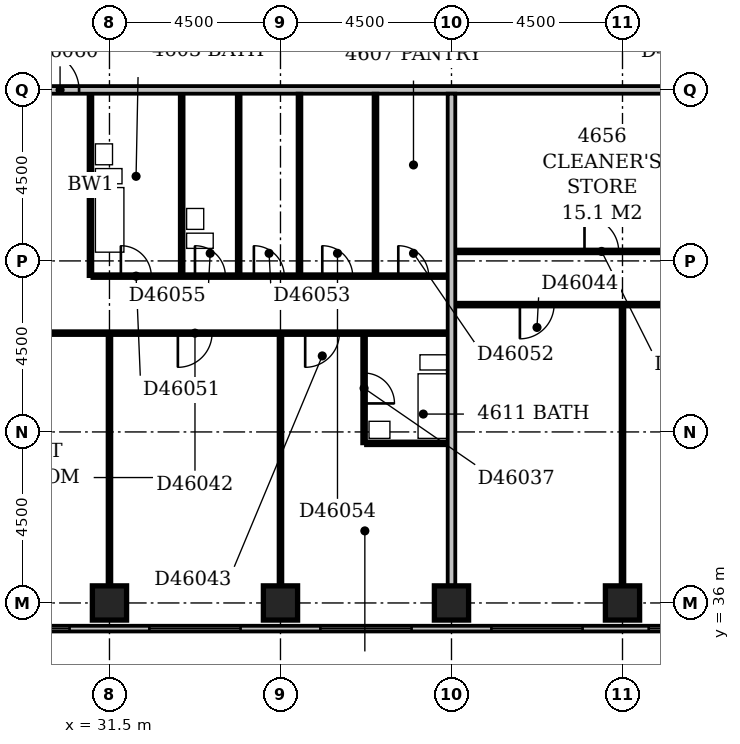
"""IFC4 building model, lengths in metres.
Left out: names, types, materials, properties, quantities, classifications, styles, units other than length and angle.
Written with IfcOpenShell. Run it as: python <this file> out.ifc"""

import sys

from ifc_helpers import new_model, si_unit, direction, frame, frame_2d, origin, origin_2d, place, context, subcontext, project, spatial, rectangle, extrude, element, fill, save


model = new_model("IFC4")
c1 = context("Model", 3, precision=1e-05, world=origin(), true_north=direction((0.0, 1.0)))
c2 = subcontext(c1, "Body", "Model", "MODEL_VIEW")
j1 = project(units=[si_unit("LENGTHUNIT", "METRE"), si_unit("PLANEANGLEUNIT", "RADIAN")], contexts=[c1])
p1 = place(None, origin())
s1 = spatial("IfcSite", under=j1, at=p1, CompositionType="ELEMENT")
p2 = place(p1, origin())
s2 = spatial("IfcBuilding", under=s1, at=p2, CompositionType="ELEMENT")
p3 = place(p2, frame((0.0, 0.0, 182.6)))
s3 = spatial("IfcBuildingStorey", under=s2, at=p3, CompositionType="ELEMENT", Elevation=182.6)
for number, where, z_axis, x_axis in (
    (1, (31.5, 36.0, -0.3), (0.0, 0.0, 1.0), (1.0, 0.0, 0.0)),
    (2, (36.0, 36.0, -0.3), (0.0, 0.0, 1.0), (1.0, 0.0, 0.0)),
    (3, (40.5, 36.0, -0.3), (0.0, 0.0, 1.0), (1.0, 0.0, 0.0)),
    (4, (45.0, 36.0, -0.3), (0.0, 0.0, 1.0), (1.0, 0.0, 0.0)),
):
    element("IfcColumn", number, at=place(p3, frame(where, z_axis=z_axis, x_axis=x_axis)), inside=s3, PredefinedType="COLUMN", context=c2, shape_type="SweptSolid", body=[
        extrude(rectangle(XDim=0.9, YDim=0.9, at=origin_2d()), origin(), (0.0, 0.0, 1.0), 3.55),
    ])
p4 = place(p3, frame((23.1, 35.325, 0.0), z_axis=(0.0, 0.0, 1.0), x_axis=(1.0, 0.0, 0.0)))
e5 = element("IfcWall", 5, at=p4, inside=s3, PredefinedType="STANDARD", context=c2, shape_type="SweptSolid", body=[
    extrude(rectangle(XDim=45.15, YDim=0.15, at=frame_2d((22.575, 0.0))), origin(), (0.0, 0.0, 1.0), 2.7),
])
p5 = place(p4, frame((1.989, 0.0, 0.6)))
e6 = element("IfcOpeningElement", 6, at=p5, cuts=e5, PredefinedType="OPENING", context=c2, shape_type="SweptSolid", body=[
    extrude(rectangle(XDim=1.2, YDim=1.8, at=frame_2d((0.6, 0.9))), frame((0.0, 0.087, 0.0), z_axis=(0.0, -1.0, 0.0), x_axis=(1.0, 0.0, 0.0)), (0.0, 0.0, 1.0), 0.174),
])
p6 = place(p4, frame((4.95, 0.0, 0.6)))
e7 = element("IfcOpeningElement", 7, at=p6, cuts=e5, PredefinedType="OPENING", context=c2, shape_type="SweptSolid", body=[
    extrude(rectangle(XDim=2.4, YDim=1.8, at=frame_2d((1.2, 0.9))), frame((0.0, 0.087, 0.0), z_axis=(0.0, -1.0, 0.0), x_axis=(1.0, 0.0, 0.0)), (0.0, 0.0, 1.0), 0.174),
])
p7 = place(p4, frame((9.45, 0.0, 0.6)))
e8 = element("IfcOpeningElement", 8, at=p7, cuts=e5, PredefinedType="OPENING", context=c2, shape_type="SweptSolid", body=[
    extrude(rectangle(XDim=2.4, YDim=1.8, at=frame_2d((1.2, 0.9))), frame((0.0, 0.087, 0.0), z_axis=(0.0, -1.0, 0.0), x_axis=(1.0, 0.0, 0.0)), (0.0, 0.0, 1.0), 0.174),
])
p8 = place(p4, frame((13.95, 0.0, 0.6)))
e9 = element("IfcOpeningElement", 9, at=p8, cuts=e5, PredefinedType="OPENING", context=c2, shape_type="SweptSolid", body=[
    extrude(rectangle(XDim=2.4, YDim=1.8, at=frame_2d((1.2, 0.9))), frame((0.0, 0.087, 0.0), z_axis=(0.0, -1.0, 0.0), x_axis=(1.0, 0.0, 0.0)), (0.0, 0.0, 1.0), 0.174),
])
p9 = place(p4, frame((18.45, 0.0, 0.6)))
e10 = element("IfcOpeningElement", 10, at=p9, cuts=e5, PredefinedType="OPENING", context=c2, shape_type="SweptSolid", body=[
    extrude(rectangle(XDim=2.4, YDim=1.8, at=frame_2d((1.2, 0.9))), frame((0.0, 0.087, 0.0), z_axis=(0.0, -1.0, 0.0), x_axis=(1.0, 0.0, 0.0)), (0.0, 0.0, 1.0), 0.174),
])
p10 = place(p4, frame((22.589, 0.0, 0.6)))
e11 = element("IfcOpeningElement", 11, at=p10, cuts=e5, PredefinedType="OPENING", context=c2, shape_type="SweptSolid", body=[
    extrude(rectangle(XDim=2.1, YDim=1.8, at=frame_2d((1.05, 0.9))), frame((0.0, 0.087, 0.0), z_axis=(0.0, -1.0, 0.0), x_axis=(1.0, 0.0, 0.0)), (0.0, 0.0, 1.0), 0.174),
])
p11 = place(p4, frame((28.653, 0.0, 0.6)))
e12 = element("IfcOpeningElement", 12, at=p11, cuts=e5, PredefinedType="OPENING", context=c2, shape_type="SweptSolid", body=[
    extrude(rectangle(XDim=1.5, YDim=1.8, at=frame_2d((0.75, 0.9))), frame((0.0, 0.087, 0.0), z_axis=(0.0, -1.0, 0.0), x_axis=(1.0, 0.0, 0.0)), (0.0, 0.0, 1.0), 0.174),
])
p12 = place(p4, frame((31.95, 0.0, 0.6)))
e13 = element("IfcOpeningElement", 13, at=p12, cuts=e5, PredefinedType="OPENING", context=c2, shape_type="SweptSolid", body=[
    extrude(rectangle(XDim=2.4, YDim=1.8, at=frame_2d((1.2, 0.9))), frame((0.0, 0.087, 0.0), z_axis=(0.0, -1.0, 0.0), x_axis=(1.0, 0.0, 0.0)), (0.0, 0.0, 1.0), 0.174),
])
p13 = place(p4, frame((36.45, 0.0, 0.6)))
e14 = element("IfcOpeningElement", 14, at=p13, cuts=e5, PredefinedType="OPENING", context=c2, shape_type="SweptSolid", body=[
    extrude(rectangle(XDim=2.4, YDim=1.8, at=frame_2d((1.2, 0.9))), frame((0.0, 0.087, 0.0), z_axis=(0.0, -1.0, 0.0), x_axis=(1.0, 0.0, 0.0)), (0.0, 0.0, 1.0), 0.174),
])
p14 = place(p4, frame((40.95, 0.0, 0.6)))
e15 = element("IfcOpeningElement", 15, at=p14, cuts=e5, PredefinedType="OPENING", context=c2, shape_type="SweptSolid", body=[
    extrude(rectangle(XDim=2.4, YDim=1.8, at=frame_2d((1.2, 0.9))), frame((0.0, 0.087, 0.0), z_axis=(0.0, -1.0, 0.0), x_axis=(1.0, 0.0, 0.0)), (0.0, 0.0, 1.0), 0.174),
])
p15 = place(p3, frame((31.5, 36.45, 0.0), z_axis=(0.0, 0.0, 1.0), x_axis=(0.0, 1.0, 0.0)))
e16 = element("IfcWall", 16, at=p15, inside=s3, PredefinedType="PARTITIONING", context=c2, shape_type="SweptSolid", body=[
    extrude(rectangle(XDim=6.6, YDim=0.1, at=frame_2d((3.3, 0.0))), origin(), (0.0, 0.0, 1.0), 3.25),
])
p16 = place(p3, frame((36.0, 36.45, 0.0), z_axis=(0.0, 0.0, 1.0), x_axis=(0.0, 1.0, 0.0)))
e17 = element("IfcWall", 17, at=p16, inside=s3, PredefinedType="PARTITIONING", context=c2, shape_type="SweptSolid", body=[
    extrude(rectangle(XDim=6.6, YDim=0.1, at=frame_2d((3.3, 0.0))), origin(), (0.0, 0.0, 1.0), 2.35),
])
p17 = place(p3, frame((40.5, 36.45, 0.0), z_axis=(0.0, 0.0, 1.0), x_axis=(0.0, 1.0, 0.0)))
e18 = element("IfcWall", 18, at=p17, inside=s3, PredefinedType="PARTITIONING", context=c2, shape_type="SweptSolid", body=[
    extrude(rectangle(XDim=12.95, YDim=0.2, at=frame_2d((6.475, 0.0))), origin(), (0.0, 0.0, 1.0), 3.25),
])
p18 = place(p3, frame((45.0, 36.45, 0.0), z_axis=(0.0, 0.0, 1.0), x_axis=(0.0, 1.0, 0.0)))
e19 = element("IfcWall", 19, at=p18, inside=s3, PredefinedType="PARTITIONING", context=c2, shape_type="SweptSolid", body=[
    extrude(rectangle(XDim=7.35, YDim=0.1, at=frame_2d((3.675, 0.0))), origin(), (0.0, 0.0, 1.0), 2.55),
])
p19 = place(p3, frame((38.2, 40.2, 0.0), z_axis=(0.0, 0.0, 1.0), x_axis=(0.0, 1.0, 0.0)))
e20 = element("IfcWall", 20, at=p19, inside=s3, PredefinedType="PLUMBINGWALL", context=c2, shape_type="SweptSolid", body=[
    extrude(rectangle(XDim=2.85, YDim=0.1, at=frame_2d((1.425, 0.0))), origin(), (0.0, 0.0, 1.0), 3.25),
])
p20 = place(p19, frame((1.05, 0.0, 0.0)))
e21 = element("IfcOpeningElement", 21, at=p20, cuts=e20, PredefinedType="OPENING", context=c2, shape_type="SweptSolid", body=[
    extrude(rectangle(XDim=0.8, YDim=2.1, at=frame_2d((0.4, 1.05))), frame((0.0, 0.062, 0.0), z_axis=(0.0, -1.0, 0.0), x_axis=(1.0, 0.0, 0.0)), (0.0, 0.0, 1.0), 0.124),
])
p21 = place(p3, frame((38.25, 40.2, 0.0), z_axis=(0.0, 0.0, 1.0), x_axis=(1.0, 0.0, 0.0)))
e22 = element("IfcWall", 22, at=p21, inside=s3, PredefinedType="PLUMBINGWALL", context=c2, shape_type="SweptSolid", body=[
    extrude(rectangle(XDim=2.15, YDim=0.1, at=frame_2d((1.075, 0.0))), origin(), (0.0, 0.0, 1.0), 3.25),
])
p22 = place(p3, frame((22.6, 43.1, 0.0), z_axis=(0.0, 0.0, 1.0), x_axis=(1.0, 0.0, 0.0)))
e23 = element("IfcWall", 23, at=p22, inside=s3, PredefinedType="PARTITIONING", context=c2, shape_type="SweptSolid", body=[
    extrude(rectangle(XDim=17.8, YDim=0.1, at=frame_2d((8.9, 0.0))), origin(), (0.0, 0.0, 1.0), 3.25),
])
p23 = place(p22, frame((3.9, 0.0, 0.0)))
e24 = element("IfcOpeningElement", 24, at=p23, cuts=e23, PredefinedType="OPENING", context=c2, shape_type="SweptSolid", body=[
    extrude(rectangle(XDim=0.9, YDim=2.1, at=frame_2d((0.45, 1.05))), frame((0.0, 0.062, 0.0), z_axis=(0.0, -1.0, 0.0), x_axis=(1.0, 0.0, 0.0)), (0.0, 0.0, 1.0), 0.124),
])
p24 = place(p22, frame((10.7, 0.0, 0.0)))
e25 = element("IfcOpeningElement", 25, at=p24, cuts=e23, PredefinedType="OPENING", context=c2, shape_type="SweptSolid", body=[
    extrude(rectangle(XDim=0.9, YDim=2.1, at=frame_2d((0.45, 1.05))), frame((0.0, 0.062, 0.0), z_axis=(0.0, -1.0, 0.0), x_axis=(1.0, 0.0, 0.0)), (0.0, 0.0, 1.0), 0.124),
])
p25 = place(p22, frame((14.05, 0.0, 0.0)))
e26 = element("IfcOpeningElement", 26, at=p25, cuts=e23, PredefinedType="OPENING", context=c2, shape_type="SweptSolid", body=[
    extrude(rectangle(XDim=0.9, YDim=2.1, at=frame_2d((0.45, 1.05))), frame((0.0, 0.062, 0.0), z_axis=(0.0, -1.0, 0.0), x_axis=(1.0, 0.0, 0.0)), (0.0, 0.0, 1.0), 0.124),
])
p26 = place(p3, frame((40.6, 43.85, 0.0), z_axis=(0.0, 0.0, 1.0), x_axis=(1.0, 0.0, 0.0)))
e27 = element("IfcWall", 27, at=p26, inside=s3, PredefinedType="PARTITIONING", context=c2, shape_type="SweptSolid", body=[
    extrude(rectangle(XDim=13.3, YDim=0.1, at=frame_2d((6.65, 0.0))), origin(), (0.0, 0.0, 1.0), 3.25),
])
p27 = place(p26, frame((1.7, 0.0, 0.0)))
e28 = element("IfcOpeningElement", 28, at=p27, cuts=e27, PredefinedType="OPENING", context=c2, shape_type="SweptSolid", body=[
    extrude(rectangle(XDim=0.9, YDim=2.1, at=frame_2d((0.45, 1.05))), frame((0.0, 0.062, 0.0), z_axis=(0.0, -1.0, 0.0), x_axis=(1.0, 0.0, 0.0)), (0.0, 0.0, 1.0), 0.124),
])
p28 = place(p26, frame((6.2, 0.0, 0.0)))
e29 = element("IfcOpeningElement", 29, at=p28, cuts=e27, PredefinedType="OPENING", context=c2, shape_type="SweptSolid", body=[
    extrude(rectangle(XDim=0.9, YDim=2.1, at=frame_2d((0.45, 1.05))), frame((0.0, 0.062, 0.0), z_axis=(0.0, -1.0, 0.0), x_axis=(1.0, 0.0, 0.0)), (0.0, 0.0, 1.0), 0.124),
])
p29 = place(p26, frame((10.7, 0.0, 0.0)))
e30 = element("IfcOpeningElement", 30, at=p29, cuts=e27, PredefinedType="OPENING", context=c2, shape_type="SweptSolid", body=[
    extrude(rectangle(XDim=0.9, YDim=2.1, at=frame_2d((0.45, 1.05))), frame((0.0, 0.062, 0.0), z_axis=(0.0, -1.0, 0.0), x_axis=(1.0, 0.0, 0.0)), (0.0, 0.0, 1.0), 0.124),
])
p30 = place(p3, frame((31.0, 44.6, 0.0), z_axis=(0.0, 0.0, 1.0), x_axis=(0.0, 1.0, 0.0)))
e31 = element("IfcWall", 31, at=p30, inside=s3, PredefinedType="PLUMBINGWALL", context=c2, shape_type="SweptSolid", body=[
    extrude(rectangle(XDim=4.8, YDim=0.1, at=frame_2d((2.4, 0.0))), origin(), (0.0, 0.0, 1.0), 3.25),
])
p31 = place(p3, frame((31.05, 44.6, 0.0), z_axis=(0.0, 0.0, 1.0), x_axis=(1.0, 0.0, 0.0)))
e32 = element("IfcWall", 32, at=p31, inside=s3, PredefinedType="PARTITIONING", context=c2, shape_type="SweptSolid", body=[
    extrude(rectangle(XDim=9.35, YDim=0.1, at=frame_2d((4.675, 0.0))), origin(), (0.0, 0.0, 1.0), 3.25),
])
p32 = place(p31, frame((0.75, 0.0, 0.0)))
e33 = element("IfcOpeningElement", 33, at=p32, cuts=e32, PredefinedType="OPENING", context=c2, shape_type="SweptSolid", body=[
    extrude(rectangle(XDim=0.8, YDim=2.1, at=frame_2d((0.4, 1.05))), frame((0.0, 0.062, 0.0), z_axis=(0.0, -1.0, 0.0), x_axis=(1.0, 0.0, 0.0)), (0.0, 0.0, 1.0), 0.124),
])
p33 = place(p31, frame((8.05, 0.0, 0.0)))
e34 = element("IfcOpeningElement", 34, at=p33, cuts=e32, PredefinedType="OPENING", context=c2, shape_type="SweptSolid", body=[
    extrude(rectangle(XDim=0.8, YDim=2.1, at=frame_2d((0.4, 1.05))), frame((0.0, 0.062, 0.0), z_axis=(0.0, -1.0, 0.0), x_axis=(1.0, 0.0, 0.0)), (0.0, 0.0, 1.0), 0.124),
])
p34 = place(p31, frame((4.25, 0.0, 0.0)))
e35 = element("IfcOpeningElement", 35, at=p34, cuts=e32, PredefinedType="OPENING", context=c2, shape_type="SweptSolid", body=[
    extrude(rectangle(XDim=0.8, YDim=2.1, at=frame_2d((0.4, 1.05))), frame((0.0, 0.062, 0.0), z_axis=(0.0, -1.0, 0.0), x_axis=(1.0, 0.0, 0.0)), (0.0, 0.0, 1.0), 0.124),
])
p35 = place(p31, frame((6.05, 0.0, 0.0)))
e36 = element("IfcOpeningElement", 36, at=p35, cuts=e32, PredefinedType="OPENING", context=c2, shape_type="SweptSolid", body=[
    extrude(rectangle(XDim=0.8, YDim=2.1, at=frame_2d((0.4, 1.05))), frame((0.0, 0.062, 0.0), z_axis=(0.0, -1.0, 0.0), x_axis=(1.0, 0.0, 0.0)), (0.0, 0.0, 1.0), 0.124),
])
p36 = place(p31, frame((2.7, 0.0, 0.0)))
e37 = element("IfcOpeningElement", 37, at=p36, cuts=e32, PredefinedType="OPENING", context=c2, shape_type="SweptSolid", body=[
    extrude(rectangle(XDim=0.8, YDim=2.1, at=frame_2d((0.4, 1.05))), frame((0.0, 0.062, 0.0), z_axis=(0.0, -1.0, 0.0), x_axis=(1.0, 0.0, 0.0)), (0.0, 0.0, 1.0), 0.124),
])
for number, where, z_axis, x_axis in (
    (38, (33.4, 44.65, 0.0), (0.0, 0.0, 1.0), (0.0, 1.0, 0.0)),
    (39, (34.9, 44.65, 0.0), (0.0, 0.0, 1.0), (0.0, 1.0, 0.0)),
):
    element("IfcWall", number, at=place(p3, frame(where, z_axis=z_axis, x_axis=x_axis)), inside=s3, PredefinedType="PLUMBINGWALL", context=c2, shape_type="SweptSolid", body=[
        extrude(rectangle(XDim=4.75, YDim=0.1, at=frame_2d((2.375, 0.0))), origin(), (0.0, 0.0, 1.0), 3.25),
    ])
p37 = place(p3, frame((36.5, 44.65, 0.0), z_axis=(0.0, 0.0, 1.0), x_axis=(0.0, 1.0, 0.0)))
e40 = element("IfcWall", 40, at=p37, inside=s3, PredefinedType="PARTITIONING", context=c2, shape_type="SweptSolid", body=[
    extrude(rectangle(XDim=4.75, YDim=0.1, at=frame_2d((2.375, 0.0))), origin(), (0.0, 0.0, 1.0), 2.35),
])
p38 = place(p3, frame((38.5, 44.65, 0.0), z_axis=(0.0, 0.0, 1.0), x_axis=(0.0, 1.0, 0.0)))
e41 = element("IfcWall", 41, at=p38, inside=s3, PredefinedType="PARTITIONING", context=c2, shape_type="SweptSolid", body=[
    extrude(rectangle(XDim=4.75, YDim=0.1, at=frame_2d((2.375, 0.0))), origin(), (0.0, 0.0, 1.0), 3.25),
])
p39 = place(p3, frame((40.6, 45.25, 0.0), z_axis=(0.0, 0.0, 1.0), x_axis=(1.0, 0.0, 0.0)))
e42 = element("IfcWall", 42, at=p39, inside=s3, PredefinedType="PARTITIONING", context=c2, shape_type="SweptSolid", body=[
    extrude(rectangle(XDim=7.75, YDim=0.1, at=frame_2d((3.875, 0.0))), origin(), (0.0, 0.0, 1.0), 3.25),
])
p40 = place(p39, frame((3.4, 0.0, 0.0)))
e43 = element("IfcOpeningElement", 43, at=p40, cuts=e42, PredefinedType="OPENING", context=c2, shape_type="SweptSolid", body=[
    extrude(rectangle(XDim=0.9, YDim=2.1, at=frame_2d((0.45, 1.05))), frame((0.0, 0.062, 0.0), z_axis=(0.0, -1.0, 0.0), x_axis=(1.0, 0.0, 0.0)), (0.0, 0.0, 1.0), 0.124),
])
p41 = place(p3, frame((22.6, 49.5, 0.0), z_axis=(0.0, 0.0, 1.0), x_axis=(1.0, 0.0, 0.0)))
e44 = element("IfcWall", 44, at=p41, inside=s3, PredefinedType="PARTITIONING", context=c2, shape_type="SweptSolid", body=[
    extrude(rectangle(XDim=44.45, YDim=0.2, at=frame_2d((22.225, 0.0))), origin(), (0.0, 0.0, 1.0), 3.25),
])
p42 = place(p41, frame((7.1, 0.0, 0.0)))
e45 = element("IfcOpeningElement", 45, at=p42, cuts=e44, PredefinedType="OPENING", context=c2, shape_type="SweptSolid", body=[
    extrude(rectangle(XDim=1.0, YDim=2.1, at=frame_2d((0.5, 1.05))), frame((0.0, 0.112, 0.0), z_axis=(0.0, -1.0, 0.0), x_axis=(1.0, 0.0, 0.0)), (0.0, 0.0, 1.0), 0.224),
])
p43 = place(p41, frame((26.1, 0.0, 0.0)))
e46 = element("IfcOpeningElement", 46, at=p43, cuts=e44, PredefinedType="OPENING", context=c2, shape_type="SweptSolid", body=[
    extrude(rectangle(XDim=1.0, YDim=2.1, at=frame_2d((0.5, 1.05))), frame((0.0, 0.112, 0.0), z_axis=(0.0, -1.0, 0.0), x_axis=(1.0, 0.0, 0.0)), (0.0, 0.0, 1.0), 0.224),
])
p44 = place(p41, frame((31.8, 0.0, 0.0)))
e47 = element("IfcOpeningElement", 47, at=p44, cuts=e44, PredefinedType="OPENING", context=c2, shape_type="SweptSolid", body=[
    extrude(rectangle(XDim=1.0, YDim=2.1, at=frame_2d((0.5, 1.05))), frame((0.0, 0.112, 0.0), z_axis=(0.0, -1.0, 0.0), x_axis=(1.0, 0.0, 0.0)), (0.0, 0.0, 1.0), 0.224),
])
p45 = place(p6, origin())
e48 = element("IfcWindow", 48, at=p45, inside=s3, PartitioningType="SINGLE_PANEL", PredefinedType="WINDOW", context=c2, shape_type="SweptSolid", body=[
    extrude(rectangle(XDim=2.4, YDim=1.8, at=frame_2d((1.2, 0.9))), frame((0.0, 0.03, 0.0), z_axis=(0.0, -1.0, 0.0), x_axis=(1.0, 0.0, 0.0)), (0.0, 0.0, 1.0), 0.06),
])
fill(e7, e48)
p46 = place(p7, origin())
e49 = element("IfcWindow", 49, at=p46, inside=s3, PartitioningType="SINGLE_PANEL", PredefinedType="WINDOW", context=c2, shape_type="SweptSolid", body=[
    extrude(rectangle(XDim=2.4, YDim=1.8, at=frame_2d((1.2, 0.9))), frame((0.0, 0.03, 0.0), z_axis=(0.0, -1.0, 0.0), x_axis=(1.0, 0.0, 0.0)), (0.0, 0.0, 1.0), 0.06),
])
fill(e8, e49)
p47 = place(p8, origin())
e50 = element("IfcWindow", 50, at=p47, inside=s3, PartitioningType="SINGLE_PANEL", PredefinedType="WINDOW", context=c2, shape_type="SweptSolid", body=[
    extrude(rectangle(XDim=2.4, YDim=1.8, at=frame_2d((1.2, 0.9))), frame((0.0, 0.03, 0.0), z_axis=(0.0, -1.0, 0.0), x_axis=(1.0, 0.0, 0.0)), (0.0, 0.0, 1.0), 0.06),
])
fill(e9, e50)
p48 = place(p9, origin())
e51 = element("IfcWindow", 51, at=p48, inside=s3, PartitioningType="SINGLE_PANEL", PredefinedType="WINDOW", context=c2, shape_type="SweptSolid", body=[
    extrude(rectangle(XDim=2.4, YDim=1.8, at=frame_2d((1.2, 0.9))), frame((0.0, 0.03, 0.0), z_axis=(0.0, -1.0, 0.0), x_axis=(1.0, 0.0, 0.0)), (0.0, 0.0, 1.0), 0.06),
])
fill(e10, e51)
p49 = place(p10, origin())
e52 = element("IfcWindow", 52, at=p49, inside=s3, PartitioningType="SINGLE_PANEL", PredefinedType="WINDOW", context=c2, shape_type="SweptSolid", body=[
    extrude(rectangle(XDim=2.1, YDim=1.8, at=frame_2d((1.05, 0.9))), frame((0.0, 0.03, 0.0), z_axis=(0.0, -1.0, 0.0), x_axis=(1.0, 0.0, 0.0)), (0.0, 0.0, 1.0), 0.06),
])
fill(e11, e52)
p50 = place(p20, frame((0.8, 0.0, 0.0), z_axis=(0.0, 0.0, 1.0), x_axis=(-1.0, 0.0, 0.0)))
e53 = element("IfcDoor", 53, at=p50, inside=s3, OperationType="SINGLE_SWING_RIGHT", PredefinedType="DOOR", context=c2, shape_type="SweptSolid", body=[
    extrude(rectangle(XDim=0.8, YDim=2.1, at=frame_2d((0.4, 1.05))), frame((0.0, 0.025, 0.0), z_axis=(0.0, -1.0, 0.0), x_axis=(1.0, 0.0, 0.0)), (0.0, 0.0, 1.0), 0.05),
])
fill(e21, e53)
p51 = place(p24, frame((0.9, 0.0, 0.0), z_axis=(0.0, 0.0, 1.0), x_axis=(-1.0, 0.0, 0.0)))
e54 = element("IfcDoor", 54, at=p51, inside=s3, OperationType="SINGLE_SWING_RIGHT", PredefinedType="DOOR", context=c2, shape_type="SweptSolid", body=[
    extrude(rectangle(XDim=0.9, YDim=2.1, at=frame_2d((0.45, 1.05))), frame((0.0, 0.025, 0.0), z_axis=(0.0, -1.0, 0.0), x_axis=(1.0, 0.0, 0.0)), (0.0, 0.0, 1.0), 0.05),
])
fill(e25, e54)
p52 = place(p25, frame((0.9, 0.0, 0.0), z_axis=(0.0, 0.0, 1.0), x_axis=(-1.0, 0.0, 0.0)))
e55 = element("IfcDoor", 55, at=p52, inside=s3, OperationType="SINGLE_SWING_RIGHT", PredefinedType="DOOR", context=c2, shape_type="SweptSolid", body=[
    extrude(rectangle(XDim=0.9, YDim=2.1, at=frame_2d((0.45, 1.05))), frame((0.0, 0.025, 0.0), z_axis=(0.0, -1.0, 0.0), x_axis=(1.0, 0.0, 0.0)), (0.0, 0.0, 1.0), 0.05),
])
fill(e26, e55)
p53 = place(p27, frame((0.9, 0.0, 0.0), z_axis=(0.0, 0.0, 1.0), x_axis=(-1.0, 0.0, 0.0)))
e56 = element("IfcDoor", 56, at=p53, inside=s3, OperationType="SINGLE_SWING_RIGHT", PredefinedType="DOOR", context=c2, shape_type="SweptSolid", body=[
    extrude(rectangle(XDim=0.9, YDim=2.1, at=frame_2d((0.45, 1.05))), frame((0.0, 0.025, 0.0), z_axis=(0.0, -1.0, 0.0), x_axis=(1.0, 0.0, 0.0)), (0.0, 0.0, 1.0), 0.05),
])
fill(e28, e56)
p54 = place(p32, origin())
e57 = element("IfcDoor", 57, at=p54, inside=s3, OperationType="SINGLE_SWING_LEFT", PredefinedType="DOOR", context=c2, shape_type="SweptSolid", body=[
    extrude(rectangle(XDim=0.8, YDim=2.1, at=frame_2d((0.4, 1.05))), frame((0.0, 0.025, 0.0), z_axis=(0.0, -1.0, 0.0), x_axis=(1.0, 0.0, 0.0)), (0.0, 0.0, 1.0), 0.05),
])
fill(e33, e57)
p55 = place(p33, origin())
e58 = element("IfcDoor", 58, at=p55, inside=s3, OperationType="SINGLE_SWING_LEFT", PredefinedType="DOOR", context=c2, shape_type="SweptSolid", body=[
    extrude(rectangle(XDim=0.8, YDim=2.1, at=frame_2d((0.4, 1.05))), frame((0.0, 0.025, 0.0), z_axis=(0.0, -1.0, 0.0), x_axis=(1.0, 0.0, 0.0)), (0.0, 0.0, 1.0), 0.05),
])
fill(e34, e58)
p56 = place(p34, origin())
e59 = element("IfcDoor", 59, at=p56, inside=s3, OperationType="SINGLE_SWING_LEFT", PredefinedType="DOOR", context=c2, shape_type="SweptSolid", body=[
    extrude(rectangle(XDim=0.8, YDim=2.1, at=frame_2d((0.4, 1.05))), frame((0.0, 0.025, 0.0), z_axis=(0.0, -1.0, 0.0), x_axis=(1.0, 0.0, 0.0)), (0.0, 0.0, 1.0), 0.05),
])
fill(e35, e59)
p57 = place(p35, origin())
e60 = element("IfcDoor", 60, at=p57, inside=s3, OperationType="SINGLE_SWING_LEFT", PredefinedType="DOOR", context=c2, shape_type="SweptSolid", body=[
    extrude(rectangle(XDim=0.8, YDim=2.1, at=frame_2d((0.4, 1.05))), frame((0.0, 0.025, 0.0), z_axis=(0.0, -1.0, 0.0), x_axis=(1.0, 0.0, 0.0)), (0.0, 0.0, 1.0), 0.05),
])
fill(e36, e60)
p58 = place(p36, origin())
e61 = element("IfcDoor", 61, at=p58, inside=s3, OperationType="SINGLE_SWING_LEFT", PredefinedType="DOOR", context=c2, shape_type="SweptSolid", body=[
    extrude(rectangle(XDim=0.8, YDim=2.1, at=frame_2d((0.4, 1.05))), frame((0.0, 0.025, 0.0), z_axis=(0.0, -1.0, 0.0), x_axis=(1.0, 0.0, 0.0)), (0.0, 0.0, 1.0), 0.05),
])
fill(e37, e61)
p59 = place(p40, origin())
e62 = element("IfcDoor", 62, at=p59, inside=s3, OperationType="SINGLE_SWING_LEFT", PredefinedType="DOOR", context=c2, shape_type="SweptSolid", body=[
    extrude(rectangle(XDim=0.9, YDim=2.1, at=frame_2d((0.45, 1.05))), frame((0.0, 0.025, 0.0), z_axis=(0.0, -1.0, 0.0), x_axis=(1.0, 0.0, 0.0)), (0.0, 0.0, 1.0), 0.05),
])
fill(e43, e62)
p60 = place(p42, origin())
e63 = element("IfcDoor", 63, at=p60, inside=s3, OperationType="SINGLE_SWING_LEFT", PredefinedType="DOOR", context=c2, shape_type="SweptSolid", body=[
    extrude(rectangle(XDim=1.0, YDim=2.1, at=frame_2d((0.5, 1.05))), frame((0.0, 0.025, 0.0), z_axis=(0.0, -1.0, 0.0), x_axis=(1.0, 0.0, 0.0)), (0.0, 0.0, 1.0), 0.05),
])
fill(e45, e63)
save(model, sys.argv[1])
